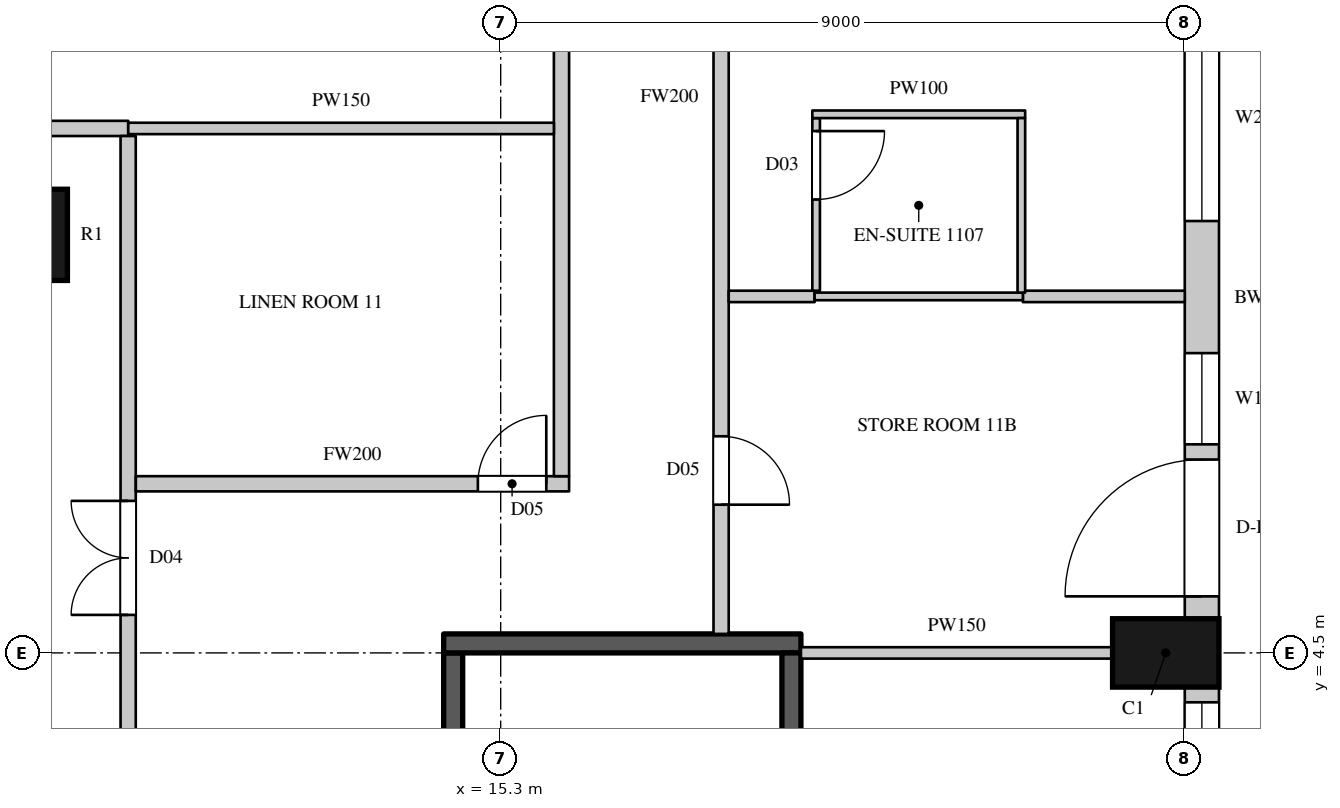
"""IFC4 building model, lengths in metres.
Left out: names, types, materials, properties, quantities, classifications, styles, units other than length and angle.
Written with IfcOpenShell. Run it as: python <this file> out.ifc"""

import sys

from ifc_helpers import new_model, si_unit, direction, frame, frame_2d, origin, origin_2d, place, context, subcontext, project, spatial, rectangle, circle, extrude, element, fill, save


model = new_model("IFC4")
c1 = context("Model", 3, precision=1e-05, world=origin(), true_north=direction((0.0, 1.0)))
c2 = subcontext(c1, "Body", "Model", "MODEL_VIEW")
j1 = project(units=[si_unit("LENGTHUNIT", "METRE"), si_unit("PLANEANGLEUNIT", "RADIAN")], contexts=[c1])
p1 = place(None, origin())
s1 = spatial("IfcSite", under=j1, at=p1, CompositionType="ELEMENT")
p2 = place(p1, origin())
s2 = spatial("IfcBuilding", under=s1, at=p2, CompositionType="ELEMENT")
p3 = place(p2, frame((0.0, 0.0, 69.9)))
s3 = spatial("IfcBuildingStorey", under=s2, at=p3, CompositionType="ELEMENT", Elevation=69.9)
p4 = place(p3, frame((24.05, 4.5, 0.0), z_axis=(0.0, 0.0, 1.0), x_axis=(0.0, 1.0, 0.0)))
e1 = element("IfcColumn", 1, at=p4, inside=s3, PredefinedType="COLUMN", context=c2, shape_type="SweptSolid", body=[
    extrude(rectangle(XDim=0.9, YDim=1.4, at=origin_2d()), origin(), (0.0, 0.0, 1.0), 3.6),
])
p5 = place(p3, frame((9.0, 10.0, 0.0), z_axis=(0.0, 0.0, 1.0), x_axis=(1.0, 0.0, 0.0)))
e2 = element("IfcColumn", 2, at=p5, inside=s3, PredefinedType="COLUMN", context=c2, shape_type="SweptSolid", body=[
    extrude(circle(Radius=0.6, at=origin_2d()), origin(), (0.0, 0.0, 1.0), 3.6),
])
p6 = place(p3, frame((24.525, -4.05, 0.0), z_axis=(0.0, 0.0, 1.0), x_axis=(0.0, 1.0, 0.0)))
e3 = element("IfcWall", 3, at=p6, inside=s3, PredefinedType="SOLIDWALL", context=c2, shape_type="SweptSolid", body=[
    extrude(rectangle(XDim=8.1, YDim=0.45, at=frame_2d((4.05, 0.0))), origin(), (0.0, 0.0, 1.0), 3.3),
])
p7 = place(p6, frame((0.2, 0.0, 0.0)))
e4 = element("IfcOpeningElement", 4, at=p7, cuts=e3, PredefinedType="OPENING", context=c2, shape_type="SweptSolid", body=[
    extrude(rectangle(XDim=1.8, YDim=2.4, at=frame_2d((0.9, 1.2))), frame((0.0, 0.235, 0.0), z_axis=(0.0, -1.0, 0.0), x_axis=(1.0, 0.0, 0.0)), (0.0, 0.0, 1.0), 0.47),
])
p8 = place(p6, frame((2.2, 0.0, 1.05)))
e5 = element("IfcOpeningElement", 5, at=p8, cuts=e3, PredefinedType="OPENING", context=c2, shape_type="SweptSolid", body=[
    extrude(rectangle(XDim=1.2, YDim=2.0, at=frame_2d((0.6, 1.0))), frame((0.0, 0.235, 0.0), z_axis=(0.0, -1.0, 0.0), x_axis=(1.0, 0.0, 0.0)), (0.0, 0.0, 1.0), 0.47),
])
p9 = place(p6, frame((4.7, 0.0, 0.0)))
e6 = element("IfcOpeningElement", 6, at=p9, cuts=e3, PredefinedType="OPENING", context=c2, shape_type="SweptSolid", body=[
    extrude(rectangle(XDim=1.8, YDim=2.4, at=frame_2d((0.9, 1.2))), frame((0.0, 0.235, 0.0), z_axis=(0.0, -1.0, 0.0), x_axis=(1.0, 0.0, 0.0)), (0.0, 0.0, 1.0), 0.47),
])
p10 = place(p6, frame((6.7, 0.0, 1.05)))
e7 = element("IfcOpeningElement", 7, at=p10, cuts=e3, PredefinedType="OPENING", context=c2, shape_type="SweptSolid", body=[
    extrude(rectangle(XDim=1.2, YDim=2.0, at=frame_2d((0.6, 1.0))), frame((0.0, 0.235, 0.0), z_axis=(0.0, -1.0, 0.0), x_axis=(1.0, 0.0, 0.0)), (0.0, 0.0, 1.0), 0.47),
])
p11 = place(p3, frame((24.525, 4.95, 0.0), z_axis=(0.0, 0.0, 1.0), x_axis=(0.0, 1.0, 0.0)))
e8 = element("IfcWall", 8, at=p11, inside=s3, PredefinedType="SOLIDWALL", context=c2, shape_type="SweptSolid", body=[
    extrude(rectangle(XDim=8.439, YDim=0.45, at=frame_2d((4.219, 0.0))), origin(), (0.0, 0.0, 1.0), 3.3),
])
p12 = place(p11, frame((0.294, 0.0, 0.0)))
e9 = element("IfcOpeningElement", 9, at=p12, cuts=e8, PredefinedType="OPENING", context=c2, shape_type="SweptSolid", body=[
    extrude(rectangle(XDim=1.8, YDim=2.4, at=frame_2d((0.9, 1.2))), frame((0.0, 0.235, 0.0), z_axis=(0.0, -1.0, 0.0), x_axis=(1.0, 0.0, 0.0)), (0.0, 0.0, 1.0), 0.47),
])
p13 = place(p11, frame((2.294, 0.0, 1.05)))
e10 = element("IfcOpeningElement", 10, at=p13, cuts=e8, PredefinedType="OPENING", context=c2, shape_type="SweptSolid", body=[
    extrude(rectangle(XDim=1.2, YDim=2.0, at=frame_2d((0.6, 1.0))), frame((0.0, 0.235, 0.0), z_axis=(0.0, -1.0, 0.0), x_axis=(1.0, 0.0, 0.0)), (0.0, 0.0, 1.0), 0.47),
])
p14 = place(p11, frame((5.232, 0.0, 1.05)))
e11 = element("IfcOpeningElement", 11, at=p14, cuts=e8, PredefinedType="OPENING", context=c2, shape_type="SweptSolid", body=[
    extrude(rectangle(XDim=2.7, YDim=2.0, at=frame_2d((1.35, 1.0))), frame((0.0, 0.235, 0.0), z_axis=(0.0, -1.0, 0.0), x_axis=(1.0, 0.0, 0.0)), (0.0, 0.0, 1.0), 0.47),
])
p15 = place(p3, frame((-8.3, 11.4, 0.0), z_axis=(0.0, 0.0, 1.0), x_axis=(1.0, 0.0, 0.0)))
e12 = element("IfcWall", 12, at=p15, inside=s3, PredefinedType="PARTITIONING", context=c2, shape_type="SweptSolid", body=[
    extrude(rectangle(XDim=18.7, YDim=0.2, at=frame_2d((9.35, 0.0))), origin(), (0.0, 0.0, 1.0), 3.3),
])
p16 = place(p15, frame((5.5, 0.0, 0.0)))
e13 = element("IfcOpeningElement", 13, at=p16, cuts=e12, PredefinedType="OPENING", context=c2, shape_type="SweptSolid", body=[
    extrude(rectangle(XDim=1.5, YDim=2.2, at=frame_2d((0.75, 1.1))), frame((0.0, 0.11, 0.0), z_axis=(0.0, -1.0, 0.0), x_axis=(1.0, 0.0, 0.0)), (0.0, 0.0, 1.0), 0.22),
])
p17 = place(p3, frame((10.399, -12.5, 0.0), z_axis=(0.0, 0.0, 1.0), x_axis=(0.0, 1.0, 0.0)))
e14 = element("IfcWall", 14, at=p17, inside=s3, PredefinedType="PARTITIONING", context=c2, shape_type="SweptSolid", body=[
    extrude(rectangle(XDim=23.8, YDim=0.2, at=frame_2d((11.9, 0.0))), origin(), (0.0, 0.0, 1.0), 3.3),
])
p18 = place(p17, frame((6.0, 0.0, 0.0)))
e15 = element("IfcOpeningElement", 15, at=p18, cuts=e14, PredefinedType="OPENING", context=c2, shape_type="SweptSolid", body=[
    extrude(rectangle(XDim=1.5, YDim=2.2, at=frame_2d((0.75, 1.1))), frame((0.0, 0.11, 0.0), z_axis=(0.0, -1.0, 0.0), x_axis=(1.0, 0.0, 0.0)), (0.0, 0.0, 1.0), 0.22),
])
p19 = place(p17, frame((17.5, 0.0, 0.0)))
e16 = element("IfcOpeningElement", 16, at=p19, cuts=e14, PredefinedType="OPENING", context=c2, shape_type="SweptSolid", body=[
    extrude(rectangle(XDim=1.5, YDim=2.2, at=frame_2d((0.75, 1.1))), frame((0.0, 0.11, 0.0), z_axis=(0.0, -1.0, 0.0), x_axis=(1.0, 0.0, 0.0)), (0.0, 0.0, 1.0), 0.22),
])
p20 = place(p17, frame((7.7, 0.0, 0.0)))
e17 = element("IfcOpeningElement", 17, at=p20, cuts=e14, PredefinedType="OPENING", context=c2, shape_type="SweptSolid", body=[
    extrude(rectangle(XDim=1.5, YDim=2.2, at=frame_2d((0.75, 1.1))), frame((0.0, 0.11, 0.0), z_axis=(0.0, -1.0, 0.0), x_axis=(1.0, 0.0, 0.0)), (0.0, 0.0, 1.0), 0.22),
])
p21 = place(p17, frame((13.15, 0.0, 0.0)))
e18 = element("IfcOpeningElement", 18, at=p21, cuts=e14, PredefinedType="OPENING", context=c2, shape_type="SweptSolid", body=[
    extrude(rectangle(XDim=1.5, YDim=2.2, at=frame_2d((0.75, 1.1))), frame((0.0, 0.11, 0.0), z_axis=(0.0, -1.0, 0.0), x_axis=(1.0, 0.0, 0.0)), (0.0, 0.0, 1.0), 0.22),
])
p22 = place(p3, frame((10.5, 6.725, 0.0), z_axis=(0.0, 0.0, 1.0), x_axis=(1.0, 0.0, 0.0)))
e19 = element("IfcWall", 19, at=p22, inside=s3, PredefinedType="PARTITIONING", context=c2, shape_type="SweptSolid", body=[
    extrude(rectangle(XDim=5.7, YDim=0.2, at=frame_2d((2.85, 0.0))), origin(), (0.0, 0.0, 1.0), 3.3),
])
p23 = place(p22, frame((4.5, 0.0, 0.0)))
e20 = element("IfcOpeningElement", 20, at=p23, cuts=e19, PredefinedType="OPENING", context=c2, shape_type="SweptSolid", body=[
    extrude(rectangle(XDim=0.9, YDim=2.2, at=frame_2d((0.45, 1.1))), frame((0.0, 0.11, 0.0), z_axis=(0.0, -1.0, 0.0), x_axis=(1.0, 0.0, 0.0)), (0.0, 0.0, 1.0), 0.22),
])
p24 = place(p3, frame((16.1, 6.825, 0.0), z_axis=(0.0, 0.0, 1.0), x_axis=(0.0, 1.0, 0.0)))
e21 = element("IfcWall", 21, at=p24, inside=s3, PredefinedType="PARTITIONING", context=c2, shape_type="SweptSolid", body=[
    extrude(rectangle(XDim=10.575, YDim=0.2, at=frame_2d((5.288, 0.0))), origin(), (0.0, 0.0, 1.0), 3.3),
])
p25 = place(p3, frame((18.2, 4.75, 0.0), z_axis=(0.0, 0.0, 1.0), x_axis=(0.0, 1.0, 0.0)))
e22 = element("IfcWall", 22, at=p25, inside=s3, PredefinedType="PARTITIONING", context=c2, shape_type="SweptSolid", body=[
    extrude(rectangle(XDim=14.134, YDim=0.2, at=frame_2d((7.067, 0.0))), origin(), (0.0, 0.0, 1.0), 3.3),
])
p26 = place(p25, frame((1.7, 0.0, 0.0)))
e23 = element("IfcOpeningElement", 23, at=p26, cuts=e22, PredefinedType="OPENING", context=c2, shape_type="SweptSolid", body=[
    extrude(rectangle(XDim=0.9, YDim=2.2, at=frame_2d((0.45, 1.1))), frame((0.0, 0.11, 0.0), z_axis=(0.0, -1.0, 0.0), x_axis=(1.0, 0.0, 0.0)), (0.0, 0.0, 1.0), 0.22),
])
p27 = place(p3, frame((10.4, 11.4, 0.0), z_axis=(0.0, 0.0, 1.0), x_axis=(1.0, 0.0, 0.0)))
e24 = element("IfcWall", 24, at=p27, inside=s3, PredefinedType="PARTITIONING", context=c2, shape_type="SweptSolid", body=[
    extrude(rectangle(XDim=5.6, YDim=0.15, at=frame_2d((2.8, 0.0))), origin(), (0.0, 0.0, 1.0), 3.3),
])
p28 = place(p3, frame((18.3, 9.19, 0.0), z_axis=(0.0, 0.0, 1.0), x_axis=(1.0, 0.0, 0.0)))
e25 = element("IfcWall", 25, at=p28, inside=s3, PredefinedType="PARTITIONING", context=c2, shape_type="SweptSolid", body=[
    extrude(rectangle(XDim=1.13, YDim=0.15, at=frame_2d((0.565, 0.0))), origin(), (0.0, 0.0, 1.0), 2.65),
])
p29 = place(p3, frame((19.25, 4.5, 0.0), z_axis=(0.0, 0.0, 1.0), x_axis=(1.0, 0.0, 0.0)))
e26 = element("IfcWall", 26, at=p29, inside=s3, PredefinedType="PARTITIONING", context=c2, shape_type="SweptSolid", body=[
    extrude(rectangle(XDim=4.1, YDim=0.15, at=frame_2d((2.05, 0.0))), origin(), (0.0, 0.0, 1.0), 3.3),
])
p30 = place(p3, frame((22.17, 9.19, 0.0), z_axis=(0.0, 0.0, 1.0), x_axis=(1.0, 0.0, 0.0)))
e27 = element("IfcWall", 27, at=p30, inside=s3, PredefinedType="PARTITIONING", context=c2, shape_type="SweptSolid", body=[
    extrude(rectangle(XDim=2.13, YDim=0.15, at=frame_2d((1.065, 0.0))), origin(), (0.0, 0.0, 1.0), 2.65),
])
p31 = place(p3, frame((14.675, -4.5, 0.0), z_axis=(0.0, 0.0, 1.0), x_axis=(0.0, 1.0, 0.0)))
e28 = element("IfcWall", 28, at=p31, inside=s3, PredefinedType="SHEAR", context=c2, shape_type="SweptSolid", body=[
    extrude(rectangle(XDim=9.0, YDim=0.25, at=frame_2d((4.5, 0.0))), origin(), (0.0, 0.0, 1.0), 3.3),
])
p32 = place(p31, frame((0.45, 0.0, 0.0)))
e29 = element("IfcOpeningElement", 29, at=p32, cuts=e28, PredefinedType="OPENING", context=c2, shape_type="SweptSolid", body=[
    extrude(rectangle(XDim=1.1, YDim=2.2, at=frame_2d((0.55, 1.1))), frame((0.0, 0.135, 0.0), z_axis=(0.0, -1.0, 0.0), x_axis=(1.0, 0.0, 0.0)), (0.0, 0.0, 1.0), 0.27),
])
p33 = place(p3, frame((14.55, 4.625, 0.0), z_axis=(0.0, 0.0, 1.0), x_axis=(1.0, 0.0, 0.0)))
e30 = element("IfcWall", 30, at=p33, inside=s3, PredefinedType="SHEAR", context=c2, shape_type="SweptSolid", body=[
    extrude(rectangle(XDim=4.7, YDim=0.25, at=frame_2d((2.35, 0.0))), origin(), (0.0, 0.0, 1.0), 3.3),
])
p34 = place(p3, frame((19.125, -4.5, 0.0), z_axis=(0.0, 0.0, 1.0), x_axis=(0.0, 1.0, 0.0)))
e31 = element("IfcWall", 31, at=p34, inside=s3, PredefinedType="SHEAR", context=c2, shape_type="SweptSolid", body=[
    extrude(rectangle(XDim=9.0, YDim=0.25, at=frame_2d((4.5, 0.0))), origin(), (0.0, 0.0, 1.0), 3.3),
])
p35 = place(p3, frame((19.43, 9.19, 0.0), z_axis=(0.0, 0.0, 1.0), x_axis=(1.0, 0.0, 0.0)))
e32 = element("IfcWall", 32, at=p35, inside=s3, PredefinedType="PARTITIONING", context=c2, shape_type="SweptSolid", body=[
    extrude(rectangle(XDim=2.74, YDim=0.1, at=frame_2d((1.37, 0.0))), origin(), (0.0, 0.0, 1.0), 2.65),
])
p36 = place(p3, frame((19.45, 9.265, 0.0), z_axis=(0.0, 0.0, 1.0), x_axis=(0.0, 1.0, 0.0)))
e33 = element("IfcWall", 33, at=p36, inside=s3, PredefinedType="PARTITIONING", context=c2, shape_type="SweptSolid", body=[
    extrude(rectangle(XDim=2.271, YDim=0.1, at=frame_2d((1.135, 0.0))), origin(), (0.0, 0.0, 1.0), 3.3),
])
p37 = place(p36, frame((1.2, 0.0, 0.0)))
e34 = element("IfcOpeningElement", 34, at=p37, cuts=e33, PredefinedType="OPENING", context=c2, shape_type="SweptSolid", body=[
    extrude(rectangle(XDim=0.9, YDim=2.2, at=frame_2d((0.45, 1.1))), frame((0.0, 0.06, 0.0), z_axis=(0.0, -1.0, 0.0), x_axis=(1.0, 0.0, 0.0)), (0.0, 0.0, 1.0), 0.12),
])
p38 = place(p3, frame((19.4, 11.586, 0.0), z_axis=(0.0, 0.0, 1.0), x_axis=(1.0, 0.0, 0.0)))
e35 = element("IfcWall", 35, at=p38, inside=s3, PredefinedType="PARTITIONING", context=c2, shape_type="SweptSolid", body=[
    extrude(rectangle(XDim=2.8, YDim=0.1, at=frame_2d((1.4, 0.0))), origin(), (0.0, 0.0, 1.0), 3.3),
])
p39 = place(p3, frame((22.15, 9.24, 0.0), z_axis=(0.0, 0.0, 1.0), x_axis=(0.0, 1.0, 0.0)))
e36 = element("IfcWall", 36, at=p39, inside=s3, PredefinedType="PARTITIONING", context=c2, shape_type="SweptSolid", body=[
    extrude(rectangle(XDim=2.296, YDim=0.1, at=frame_2d((1.148, 0.0))), origin(), (0.0, 0.0, 1.0), 3.3),
])
p40 = place(p10, origin())
e37 = element("IfcWindow", 37, at=p40, inside=s3, PartitioningType="SINGLE_PANEL", PredefinedType="WINDOW", context=c2, shape_type="SweptSolid", body=[
    extrude(rectangle(XDim=1.2, YDim=2.0, at=frame_2d((0.6, 1.0))), frame((0.0, 0.135, 0.0), z_axis=(0.0, -1.0, 0.0), x_axis=(1.0, 0.0, 0.0)), (0.0, 0.0, 1.0), 0.06),
])
fill(e7, e37)
p41 = place(p12, origin())
e38 = element("IfcDoor", 38, at=p41, inside=s3, OperationType="SLIDING_TO_LEFT", PredefinedType="DOOR", context=c2, shape_type="SweptSolid", body=[
    extrude(rectangle(XDim=1.8, YDim=2.4, at=frame_2d((0.9, 1.2))), frame((0.0, 0.13, 0.0), z_axis=(0.0, -1.0, 0.0), x_axis=(1.0, 0.0, 0.0)), (0.0, 0.0, 1.0), 0.05),
])
fill(e9, e38)
p42 = place(p13, origin())
e39 = element("IfcWindow", 39, at=p42, inside=s3, PartitioningType="SINGLE_PANEL", PredefinedType="WINDOW", context=c2, shape_type="SweptSolid", body=[
    extrude(rectangle(XDim=1.2, YDim=2.0, at=frame_2d((0.6, 1.0))), frame((0.0, 0.135, 0.0), z_axis=(0.0, -1.0, 0.0), x_axis=(1.0, 0.0, 0.0)), (0.0, 0.0, 1.0), 0.06),
])
fill(e10, e39)
p43 = place(p14, origin())
e40 = element("IfcWindow", 40, at=p43, inside=s3, PartitioningType="SINGLE_PANEL", PredefinedType="WINDOW", context=c2, shape_type="SweptSolid", body=[
    extrude(rectangle(XDim=2.7, YDim=2.0, at=frame_2d((1.35, 1.0))), frame((0.0, 0.135, 0.0), z_axis=(0.0, -1.0, 0.0), x_axis=(1.0, 0.0, 0.0)), (0.0, 0.0, 1.0), 0.06),
])
fill(e11, e40)
p44 = place(p19, origin())
e41 = element("IfcDoor", 41, at=p44, inside=s3, OperationType="DOUBLE_DOOR_SINGLE_SWING", PredefinedType="DOOR", context=c2, shape_type="SweptSolid", body=[
    extrude(rectangle(XDim=1.5, YDim=2.2, at=frame_2d((0.75, 1.1))), frame((0.0, 0.025, 0.0), z_axis=(0.0, -1.0, 0.0), x_axis=(1.0, 0.0, 0.0)), (0.0, 0.0, 1.0), 0.05),
])
fill(e16, e41)
p45 = place(p23, origin())
e42 = element("IfcDoor", 42, at=p45, inside=s3, OperationType="SINGLE_SWING_RIGHT", PredefinedType="DOOR", context=c2, shape_type="SweptSolid", body=[
    extrude(rectangle(XDim=0.9, YDim=2.2, at=frame_2d((0.45, 1.1))), frame((0.0, 0.025, 0.0), z_axis=(0.0, -1.0, 0.0), x_axis=(1.0, 0.0, 0.0)), (0.0, 0.0, 1.0), 0.05),
])
fill(e20, e42)
p46 = place(p26, origin())
e43 = element("IfcDoor", 43, at=p46, inside=s3, OperationType="SINGLE_SWING_RIGHT", PredefinedType="DOOR", context=c2, shape_type="SweptSolid", body=[
    extrude(rectangle(XDim=0.9, YDim=2.2, at=frame_2d((0.45, 1.1))), frame((0.0, 0.025, 0.0), z_axis=(0.0, -1.0, 0.0), x_axis=(1.0, 0.0, 0.0)), (0.0, 0.0, 1.0), 0.05),
])
fill(e23, e43)
p47 = place(p37, origin())
e44 = element("IfcDoor", 44, at=p47, inside=s3, OperationType="SINGLE_SWING_LEFT", PredefinedType="DOOR", context=c2, shape_type="SweptSolid", body=[
    extrude(rectangle(XDim=0.9, YDim=2.2, at=frame_2d((0.45, 1.1))), frame((0.0, 0.025, 0.0), z_axis=(0.0, -1.0, 0.0), x_axis=(1.0, 0.0, 0.0)), (0.0, 0.0, 1.0), 0.05),
])
fill(e34, e44)
save(model, sys.argv[1])
